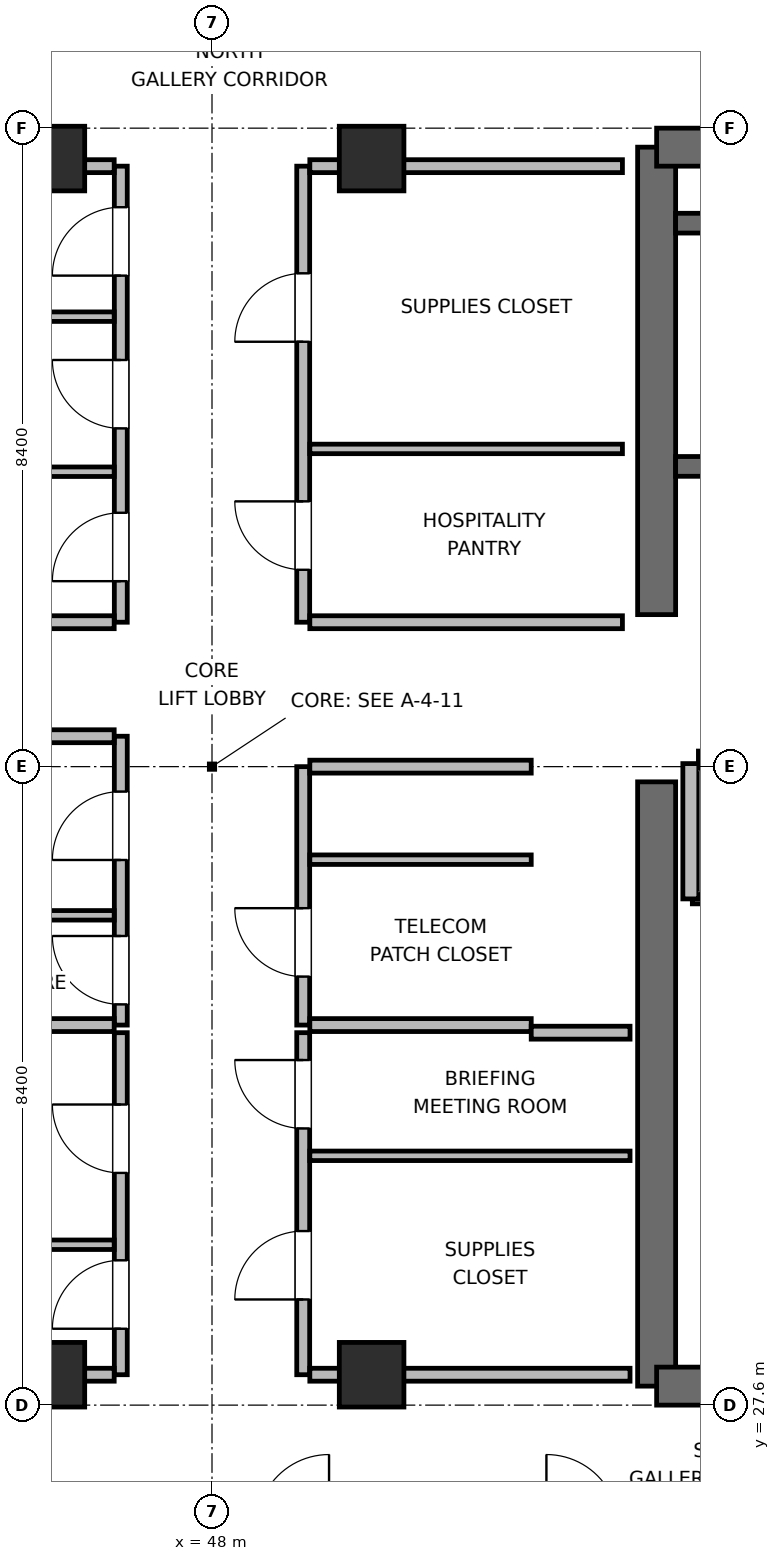
"""IFC4 building model, lengths in metres.
Left out: names, types, materials, properties, quantities, classifications, styles, units other than length and angle.
Written with IfcOpenShell. Run it as: python <this file> out.ifc"""

import sys

from ifc_helpers import new_model, si_unit, direction, frame, frame_2d, origin, origin_2d, place, context, subcontext, project, spatial, rectangle, extrude, element, fill, save


model = new_model("IFC4")
c1 = context("Model", 3, precision=1e-05, world=origin(), true_north=direction((0.0, 1.0)))
c2 = subcontext(c1, "Body", "Model", "MODEL_VIEW")
j1 = project(units=[si_unit("LENGTHUNIT", "METRE"), si_unit("PLANEANGLEUNIT", "RADIAN")], contexts=[c1])
p1 = place(None, origin())
s1 = spatial("IfcSite", under=j1, at=p1, CompositionType="ELEMENT")
p2 = place(p1, origin())
s2 = spatial("IfcBuilding", under=s1, at=p2, CompositionType="ELEMENT")
p3 = place(p2, frame((0.0, 0.0, 350.4)))
s3 = spatial("IfcBuildingStorey", under=s2, at=p3, CompositionType="ELEMENT", Elevation=350.4)
p4 = place(p3, frame((53.85, 27.85, 0.0), z_axis=(0.0, 0.0, 1.0), x_axis=(0.0, 1.0, 0.0)))
e1 = element("IfcWall", 1, at=p4, inside=s3, PredefinedType="SHEAR", context=c2, shape_type="SweptSolid", body=[
    extrude(rectangle(XDim=7.95, YDim=0.5, at=frame_2d((3.975, 0.0))), origin(), (0.0, 0.0, 1.0), 4.5),
])
p5 = place(p3, frame((53.85, 38.0, 0.0), z_axis=(0.0, 0.0, 1.0), x_axis=(0.0, 1.0, 0.0)))
e2 = element("IfcWall", 2, at=p5, inside=s3, PredefinedType="SHEAR", context=c2, shape_type="SweptSolid", body=[
    extrude(rectangle(XDim=6.15, YDim=0.5, at=frame_2d((3.075, 0.0))), origin(), (0.0, 0.0, 1.0), 4.5),
])
p6 = place(p3, frame((53.85, 27.85, 0.0), z_axis=(0.0, 0.0, 1.0), x_axis=(1.0, 0.0, 0.0)))
e3 = element("IfcWall", 3, at=p6, inside=s3, PredefinedType="SHEAR", context=c2, shape_type="SweptSolid", body=[
    extrude(rectangle(XDim=9.5, YDim=0.5, at=frame_2d((4.75, 0.0))), origin(), (0.0, 0.0, 1.0), 4.5),
])
p7 = place(p6, frame((4.025, 0.0, 0.0)))
e4 = element("IfcOpeningElement", 4, at=p7, cuts=e3, PredefinedType="OPENING", context=c2, shape_type="SweptSolid", body=[
    extrude(rectangle(XDim=1.05, YDim=2.04, at=frame_2d((0.525, 1.02))), frame((0.0, 0.26, 0.0), z_axis=(0.0, -1.0, 0.0), x_axis=(1.0, 0.0, 0.0)), (0.0, 0.0, 1.0), 0.52),
])
p8 = place(p3, frame((53.85, 44.15, 0.0), z_axis=(0.0, 0.0, 1.0), x_axis=(1.0, 0.0, 0.0)))
e5 = element("IfcWall", 5, at=p8, inside=s3, PredefinedType="SHEAR", context=c2, shape_type="SweptSolid", body=[
    extrude(rectangle(XDim=9.5, YDim=0.5, at=frame_2d((4.75, 0.0))), origin(), (0.0, 0.0, 1.0), 4.5),
])
p9 = place(p3, frame((54.1, 39.95, 0.0), z_axis=(0.0, 0.0, 1.0), x_axis=(1.0, 0.0, 0.0)))
e6 = element("IfcWall", 6, at=p9, inside=s3, PredefinedType="SHEAR", context=c2, shape_type="SweptSolid", body=[
    extrude(rectangle(XDim=9.0, YDim=0.26, at=frame_2d((4.5, 0.0))), origin(), (0.0, 0.0, 1.0), 4.5),
])
p10 = place(p9, frame((1.1, 0.0, 0.0)))
e7 = element("IfcOpeningElement", 7, at=p10, cuts=e6, PredefinedType="OPENING", context=c2, shape_type="SweptSolid", body=[
    extrude(rectangle(XDim=1.0, YDim=2.04, at=frame_2d((0.5, 1.02))), frame((0.0, 0.14, 0.0), z_axis=(0.0, -1.0, 0.0), x_axis=(1.0, 0.0, 0.0)), (0.0, 0.0, 1.0), 0.28),
])
p11 = place(p3, frame((54.1, 43.15, 0.0), z_axis=(0.0, 0.0, 1.0), x_axis=(1.0, 0.0, 0.0)))
e8 = element("IfcWall", 8, at=p11, inside=s3, PredefinedType="SHEAR", context=c2, shape_type="SweptSolid", body=[
    extrude(rectangle(XDim=9.0, YDim=0.26, at=frame_2d((4.5, 0.0))), origin(), (0.0, 0.0, 1.0), 4.5),
])
for number, where, z_axis, x_axis in (
    (9, (45.9, 28.0, 0.0), (0.0, 0.0, 1.0), (1.0, 0.0, 0.0)),
    (10, (50.1, 28.0, 0.0), (0.0, 0.0, 1.0), (1.0, 0.0, 0.0)),
    (11, (45.9, 44.0, 0.0), (0.0, 0.0, 1.0), (1.0, 0.0, 0.0)),
    (12, (50.1, 44.0, 0.0), (0.0, 0.0, 1.0), (1.0, 0.0, 0.0)),
):
    element("IfcColumn", number, at=place(p3, frame(where, z_axis=z_axis, x_axis=x_axis)), inside=s3, PredefinedType="COLUMN", context=c2, shape_type="SweptSolid", body=[
        extrude(rectangle(XDim=0.85, YDim=0.85, at=origin_2d()), origin(), (0.0, 0.0, 1.0), 4.5),
    ])
p12 = place(p3, frame((54.32, 34.3, 0.0), z_axis=(0.0, 0.0, 1.0), x_axis=(1.0, 0.0, 0.0)))
e13 = element("IfcWall", 13, at=p12, inside=s3, PredefinedType="PARTITIONING", context=c2, shape_type="SweptSolid", body=[
    extrude(rectangle(XDim=3.48, YDim=0.21, at=frame_2d((1.74, 0.0))), origin(), (0.0, 0.0, 1.0), 4.2),
])
p13 = place(p3, frame((54.4, 36.1, 0.0), z_axis=(0.0, 0.0, 1.0), x_axis=(1.0, 0.0, 0.0)))
e14 = element("IfcWall", 14, at=p13, inside=s3, PredefinedType="PARTITIONING", context=c2, shape_type="SweptSolid", body=[
    extrude(rectangle(XDim=2.1, YDim=0.21, at=frame_2d((1.05, 0.0))), origin(), (0.0, 0.0, 1.0), 4.2),
])
p14 = place(p13, frame((0.5, 0.0, 0.0)))
e15 = element("IfcOpeningElement", 15, at=p14, cuts=e14, PredefinedType="OPENING", context=c2, shape_type="SweptSolid", body=[
    extrude(rectangle(XDim=1.1, YDim=2.04, at=frame_2d((0.55, 1.02))), frame((0.0, 0.115, 0.0), z_axis=(0.0, -1.0, 0.0), x_axis=(1.0, 0.0, 0.0)), (0.0, 0.0, 1.0), 0.23),
])
p15 = place(p3, frame((54.3, 34.26, 0.0), z_axis=(0.0, 0.0, 1.0), x_axis=(0.0, 1.0, 0.0)))
e16 = element("IfcWall", 16, at=p15, inside=s3, PredefinedType="PARTITIONING", context=c2, shape_type="SweptSolid", body=[
    extrude(rectangle(XDim=1.78, YDim=0.21, at=frame_2d((0.89, 0.0))), origin(), (0.0, 0.0, 1.0), 4.2),
])
p16 = place(p3, frame((46.8, 32.6, 0.0), z_axis=(0.0, 0.0, 1.0), x_axis=(0.0, 1.0, 0.0)))
e17 = element("IfcWall", 17, at=p16, inside=s3, PredefinedType="PARTITIONING", context=c2, shape_type="SweptSolid", body=[
    extrude(rectangle(XDim=3.8, YDim=0.17, at=frame_2d((1.9, 0.0))), origin(), (0.0, 0.0, 1.0), 4.2),
])
p17 = place(p16, frame((0.272, 0.0, 0.0)))
e18 = element("IfcOpeningElement", 18, at=p17, cuts=e17, PredefinedType="OPENING", context=c2, shape_type="SweptSolid", body=[
    extrude(rectangle(XDim=0.9, YDim=2.02, at=frame_2d((0.45, 1.01))), frame((0.0, 0.095, 0.0), z_axis=(0.0, -1.0, 0.0), x_axis=(1.0, 0.0, 0.0)), (0.0, 0.0, 1.0), 0.19),
])
p18 = place(p16, frame((2.172, 0.0, 0.0)))
e19 = element("IfcOpeningElement", 19, at=p18, cuts=e17, PredefinedType="OPENING", context=c2, shape_type="SweptSolid", body=[
    extrude(rectangle(XDim=0.9, YDim=2.02, at=frame_2d((0.45, 1.01))), frame((0.0, 0.095, 0.0), z_axis=(0.0, -1.0, 0.0), x_axis=(1.0, 0.0, 0.0)), (0.0, 0.0, 1.0), 0.19),
])
for number, where, z_axis, x_axis in (
    (20, (43.8, 32.6, 0.0), (0.0, 0.0, 1.0), (1.0, 0.0, 0.0)),
    (21, (43.8, 36.4, 0.0), (0.0, 0.0, 1.0), (1.0, 0.0, 0.0)),
):
    element("IfcWall", number, at=place(p3, frame(where, z_axis=z_axis, x_axis=x_axis)), inside=s3, PredefinedType="PARTITIONING", context=c2, shape_type="SweptSolid", body=[
        extrude(rectangle(XDim=2.913, YDim=0.17, at=frame_2d((1.457, 0.0))), origin(), (0.0, 0.0, 1.0), 4.2),
    ])
p19 = place(p3, frame((43.8, 34.044, 0.0), z_axis=(0.0, 0.0, 1.0), x_axis=(1.0, 0.0, 0.0)))
e22 = element("IfcWall", 22, at=p19, inside=s3, PredefinedType="PARTITIONING", context=c2, shape_type="SweptSolid", body=[
    extrude(rectangle(XDim=2.913, YDim=0.125, at=frame_2d((1.457, 0.0))), origin(), (0.0, 0.0, 1.0), 4.2),
])
p20 = place(p3, frame((49.2, 32.6, 0.0), z_axis=(0.0, 0.0, 1.0), x_axis=(0.0, 1.0, 0.0)))
e23 = element("IfcWall", 23, at=p20, inside=s3, PredefinedType="PARTITIONING", context=c2, shape_type="SweptSolid", body=[
    extrude(rectangle(XDim=3.4, YDim=0.17, at=frame_2d((1.7, 0.0))), origin(), (0.0, 0.0, 1.0), 4.2),
])
p21 = place(p20, frame((0.638, 0.0, 0.0)))
e24 = element("IfcOpeningElement", 24, at=p21, cuts=e23, PredefinedType="OPENING", context=c2, shape_type="SweptSolid", body=[
    extrude(rectangle(XDim=0.9, YDim=2.02, at=frame_2d((0.45, 1.01))), frame((0.0, 0.095, 0.0), z_axis=(0.0, -1.0, 0.0), x_axis=(1.0, 0.0, 0.0)), (0.0, 0.0, 1.0), 0.19),
])
for number, where, z_axis, x_axis in (
    (25, (49.287, 32.6, 0.0), (0.0, 0.0, 1.0), (1.0, 0.0, 0.0)),
    (26, (49.287, 36.0, 0.0), (0.0, 0.0, 1.0), (1.0, 0.0, 0.0)),
):
    element("IfcWall", number, at=place(p3, frame(where, z_axis=z_axis, x_axis=x_axis)), inside=s3, PredefinedType="PARTITIONING", context=c2, shape_type="SweptSolid", body=[
        extrude(rectangle(XDim=2.913, YDim=0.17, at=frame_2d((1.457, 0.0))), origin(), (0.0, 0.0, 1.0), 4.2),
    ])
p22 = place(p3, frame((49.287, 34.776, 0.0), z_axis=(0.0, 0.0, 1.0), x_axis=(1.0, 0.0, 0.0)))
e27 = element("IfcWall", 27, at=p22, inside=s3, PredefinedType="PARTITIONING", context=c2, shape_type="SweptSolid", body=[
    extrude(rectangle(XDim=2.913, YDim=0.125, at=frame_2d((1.457, 0.0))), origin(), (0.0, 0.0, 1.0), 4.2),
])
p23 = place(p3, frame((46.8, 28.0, 0.0), z_axis=(0.0, 0.0, 1.0), x_axis=(0.0, 1.0, 0.0)))
e28 = element("IfcWall", 28, at=p23, inside=s3, PredefinedType="PARTITIONING", context=c2, shape_type="SweptSolid", body=[
    extrude(rectangle(XDim=4.5, YDim=0.17, at=frame_2d((2.25, 0.0))), origin(), (0.0, 0.0, 1.0), 4.2),
])
p24 = place(p23, frame((0.605, 0.0, 0.0)))
e29 = element("IfcOpeningElement", 29, at=p24, cuts=e28, PredefinedType="OPENING", context=c2, shape_type="SweptSolid", body=[
    extrude(rectangle(XDim=0.9, YDim=2.02, at=frame_2d((0.45, 1.01))), frame((0.0, 0.095, 0.0), z_axis=(0.0, -1.0, 0.0), x_axis=(1.0, 0.0, 0.0)), (0.0, 0.0, 1.0), 0.19),
])
p25 = place(p23, frame((2.655, 0.0, 0.0)))
e30 = element("IfcOpeningElement", 30, at=p25, cuts=e28, PredefinedType="OPENING", context=c2, shape_type="SweptSolid", body=[
    extrude(rectangle(XDim=0.9, YDim=2.02, at=frame_2d((0.45, 1.01))), frame((0.0, 0.095, 0.0), z_axis=(0.0, -1.0, 0.0), x_axis=(1.0, 0.0, 0.0)), (0.0, 0.0, 1.0), 0.19),
])
p26 = place(p3, frame((42.5, 28.0, 0.0), z_axis=(0.0, 0.0, 1.0), x_axis=(1.0, 0.0, 0.0)))
e31 = element("IfcWall", 31, at=p26, inside=s3, PredefinedType="PARTITIONING", context=c2, shape_type="SweptSolid", body=[
    extrude(rectangle(XDim=4.213, YDim=0.17, at=frame_2d((2.106, 0.0))), origin(), (0.0, 0.0, 1.0), 3.285),
])
p27 = place(p3, frame((42.5, 29.71, 0.0), z_axis=(0.0, 0.0, 1.0), x_axis=(1.0, 0.0, 0.0)))
e32 = element("IfcWall", 32, at=p27, inside=s3, PredefinedType="PARTITIONING", context=c2, shape_type="SweptSolid", body=[
    extrude(rectangle(XDim=4.213, YDim=0.125, at=frame_2d((2.106, 0.0))), origin(), (0.0, 0.0, 1.0), 4.2),
])
p28 = place(p3, frame((49.2, 28.0, 0.0), z_axis=(0.0, 0.0, 1.0), x_axis=(0.0, 1.0, 0.0)))
e33 = element("IfcWall", 33, at=p28, inside=s3, PredefinedType="PARTITIONING", context=c2, shape_type="SweptSolid", body=[
    extrude(rectangle(XDim=4.5, YDim=0.17, at=frame_2d((2.25, 0.0))), origin(), (0.0, 0.0, 1.0), 4.2),
])
p29 = place(p28, frame((0.99, 0.0, 0.0)))
e34 = element("IfcOpeningElement", 34, at=p29, cuts=e33, PredefinedType="OPENING", context=c2, shape_type="SweptSolid", body=[
    extrude(rectangle(XDim=0.9, YDim=2.02, at=frame_2d((0.45, 1.01))), frame((0.0, 0.095, 0.0), z_axis=(0.0, -1.0, 0.0), x_axis=(1.0, 0.0, 0.0)), (0.0, 0.0, 1.0), 0.19),
])
p30 = place(p28, frame((3.24, 0.0, 0.0)))
e35 = element("IfcOpeningElement", 35, at=p30, cuts=e33, PredefinedType="OPENING", context=c2, shape_type="SweptSolid", body=[
    extrude(rectangle(XDim=0.9, YDim=2.02, at=frame_2d((0.45, 1.01))), frame((0.0, 0.095, 0.0), z_axis=(0.0, -1.0, 0.0), x_axis=(1.0, 0.0, 0.0)), (0.0, 0.0, 1.0), 0.19),
])
p31 = place(p3, frame((49.287, 28.0, 0.0), z_axis=(0.0, 0.0, 1.0), x_axis=(1.0, 0.0, 0.0)))
e36 = element("IfcWall", 36, at=p31, inside=s3, PredefinedType="PARTITIONING", context=c2, shape_type="SweptSolid", body=[
    extrude(rectangle(XDim=4.213, YDim=0.17, at=frame_2d((2.106, 0.0))), origin(), (0.0, 0.0, 1.0), 3.285),
])
p32 = place(p3, frame((52.2, 32.5, 0.0), z_axis=(0.0, 0.0, 1.0), x_axis=(1.0, 0.0, 0.0)))
e37 = element("IfcWall", 37, at=p32, inside=s3, PredefinedType="PARTITIONING", context=c2, shape_type="SweptSolid", body=[
    extrude(rectangle(XDim=1.3, YDim=0.17, at=frame_2d((0.65, 0.0))), origin(), (0.0, 0.0, 1.0), 4.2),
])
p33 = place(p3, frame((49.287, 30.88, 0.0), z_axis=(0.0, 0.0, 1.0), x_axis=(1.0, 0.0, 0.0)))
e38 = element("IfcWall", 38, at=p33, inside=s3, PredefinedType="PARTITIONING", context=c2, shape_type="SweptSolid", body=[
    extrude(rectangle(XDim=4.213, YDim=0.125, at=frame_2d((2.106, 0.0))), origin(), (0.0, 0.0, 1.0), 4.2),
])
p34 = place(p3, frame((46.8, 37.9, 0.0), z_axis=(0.0, 0.0, 1.0), x_axis=(0.0, 1.0, 0.0)))
e39 = element("IfcWall", 39, at=p34, inside=s3, PredefinedType="PARTITIONING", context=c2, shape_type="SweptSolid", body=[
    extrude(rectangle(XDim=6.0, YDim=0.17, at=frame_2d((3.0, 0.0))), origin(), (0.0, 0.0, 1.0), 4.2),
])
p35 = place(p34, frame((0.54, 0.0, 0.0)))
e40 = element("IfcOpeningElement", 40, at=p35, cuts=e39, PredefinedType="OPENING", context=c2, shape_type="SweptSolid", body=[
    extrude(rectangle(XDim=0.9, YDim=2.02, at=frame_2d((0.45, 1.01))), frame((0.0, 0.095, 0.0), z_axis=(0.0, -1.0, 0.0), x_axis=(1.0, 0.0, 0.0)), (0.0, 0.0, 1.0), 0.19),
])
p36 = place(p34, frame((2.55, 0.0, 0.0)))
e41 = element("IfcOpeningElement", 41, at=p36, cuts=e39, PredefinedType="OPENING", context=c2, shape_type="SweptSolid", body=[
    extrude(rectangle(XDim=0.9, YDim=2.02, at=frame_2d((0.45, 1.01))), frame((0.0, 0.095, 0.0), z_axis=(0.0, -1.0, 0.0), x_axis=(1.0, 0.0, 0.0)), (0.0, 0.0, 1.0), 0.19),
])
p37 = place(p34, frame((4.56, 0.0, 0.0)))
e42 = element("IfcOpeningElement", 42, at=p37, cuts=e39, PredefinedType="OPENING", context=c2, shape_type="SweptSolid", body=[
    extrude(rectangle(XDim=0.9, YDim=2.02, at=frame_2d((0.45, 1.01))), frame((0.0, 0.095, 0.0), z_axis=(0.0, -1.0, 0.0), x_axis=(1.0, 0.0, 0.0)), (0.0, 0.0, 1.0), 0.19),
])
p38 = place(p3, frame((42.5, 37.9, 0.0), z_axis=(0.0, 0.0, 1.0), x_axis=(1.0, 0.0, 0.0)))
e43 = element("IfcWall", 43, at=p38, inside=s3, PredefinedType="PARTITIONING", context=c2, shape_type="SweptSolid", body=[
    extrude(rectangle(XDim=4.213, YDim=0.17, at=frame_2d((2.106, 0.0))), origin(), (0.0, 0.0, 1.0), 4.2),
])
p39 = place(p3, frame((42.5, 43.9, 0.0), z_axis=(0.0, 0.0, 1.0), x_axis=(1.0, 0.0, 0.0)))
e44 = element("IfcWall", 44, at=p39, inside=s3, PredefinedType="PARTITIONING", context=c2, shape_type="SweptSolid", body=[
    extrude(rectangle(XDim=4.213, YDim=0.17, at=frame_2d((2.106, 0.0))), origin(), (0.0, 0.0, 1.0), 3.285),
])
for number, where, z_axis, x_axis in (
    (45, (42.5, 39.88, 0.0), (0.0, 0.0, 1.0), (1.0, 0.0, 0.0)),
    (46, (42.5, 41.92, 0.0), (0.0, 0.0, 1.0), (1.0, 0.0, 0.0)),
):
    element("IfcWall", number, at=place(p3, frame(where, z_axis=z_axis, x_axis=x_axis)), inside=s3, PredefinedType="PARTITIONING", context=c2, shape_type="SweptSolid", body=[
        extrude(rectangle(XDim=4.213, YDim=0.125, at=frame_2d((2.106, 0.0))), origin(), (0.0, 0.0, 1.0), 4.2),
    ])
p40 = place(p3, frame((49.2, 37.9, 0.0), z_axis=(0.0, 0.0, 1.0), x_axis=(0.0, 1.0, 0.0)))
e47 = element("IfcWall", 47, at=p40, inside=s3, PredefinedType="PARTITIONING", context=c2, shape_type="SweptSolid", body=[
    extrude(rectangle(XDim=6.0, YDim=0.17, at=frame_2d((3.0, 0.0))), origin(), (0.0, 0.0, 1.0), 4.2),
])
p41 = place(p40, frame((0.69, 0.0, 0.0)))
e48 = element("IfcOpeningElement", 48, at=p41, cuts=e47, PredefinedType="OPENING", context=c2, shape_type="SweptSolid", body=[
    extrude(rectangle(XDim=0.9, YDim=2.02, at=frame_2d((0.45, 1.01))), frame((0.0, 0.095, 0.0), z_axis=(0.0, -1.0, 0.0), x_axis=(1.0, 0.0, 0.0)), (0.0, 0.0, 1.0), 0.19),
])
p42 = place(p40, frame((3.69, 0.0, 0.0)))
e49 = element("IfcOpeningElement", 49, at=p42, cuts=e47, PredefinedType="OPENING", context=c2, shape_type="SweptSolid", body=[
    extrude(rectangle(XDim=0.9, YDim=2.02, at=frame_2d((0.45, 1.01))), frame((0.0, 0.095, 0.0), z_axis=(0.0, -1.0, 0.0), x_axis=(1.0, 0.0, 0.0)), (0.0, 0.0, 1.0), 0.19),
])
p43 = place(p3, frame((49.287, 37.9, 0.0), z_axis=(0.0, 0.0, 1.0), x_axis=(1.0, 0.0, 0.0)))
e50 = element("IfcWall", 50, at=p43, inside=s3, PredefinedType="PARTITIONING", context=c2, shape_type="SweptSolid", body=[
    extrude(rectangle(XDim=4.113, YDim=0.17, at=frame_2d((2.056, 0.0))), origin(), (0.0, 0.0, 1.0), 4.2),
])
p44 = place(p3, frame((49.287, 43.9, 0.0), z_axis=(0.0, 0.0, 1.0), x_axis=(1.0, 0.0, 0.0)))
e51 = element("IfcWall", 51, at=p44, inside=s3, PredefinedType="PARTITIONING", context=c2, shape_type="SweptSolid", body=[
    extrude(rectangle(XDim=4.113, YDim=0.17, at=frame_2d((2.056, 0.0))), origin(), (0.0, 0.0, 1.0), 3.285),
])
p45 = place(p3, frame((49.287, 40.18, 0.0), z_axis=(0.0, 0.0, 1.0), x_axis=(1.0, 0.0, 0.0)))
e52 = element("IfcWall", 52, at=p45, inside=s3, PredefinedType="PARTITIONING", context=c2, shape_type="SweptSolid", body=[
    extrude(rectangle(XDim=4.113, YDim=0.125, at=frame_2d((2.056, 0.0))), origin(), (0.0, 0.0, 1.0), 4.2),
])
p46 = place(p17, origin())
e53 = element("IfcDoor", 53, at=p46, inside=s3, OperationType="SINGLE_SWING_RIGHT", PredefinedType="DOOR", context=c2, shape_type="SweptSolid", body=[
    extrude(rectangle(XDim=0.9, YDim=2.02, at=frame_2d((0.45, 1.01))), frame((0.0, 0.025, 0.0), z_axis=(0.0, -1.0, 0.0), x_axis=(1.0, 0.0, 0.0)), (0.0, 0.0, 1.0), 0.05),
])
fill(e18, e53)
p47 = place(p18, origin())
e54 = element("IfcDoor", 54, at=p47, inside=s3, OperationType="SINGLE_SWING_LEFT", PredefinedType="DOOR", context=c2, shape_type="SweptSolid", body=[
    extrude(rectangle(XDim=0.9, YDim=2.02, at=frame_2d((0.45, 1.01))), frame((0.0, 0.025, 0.0), z_axis=(0.0, -1.0, 0.0), x_axis=(1.0, 0.0, 0.0)), (0.0, 0.0, 1.0), 0.05),
])
fill(e19, e54)
p48 = place(p21, origin())
e55 = element("IfcDoor", 55, at=p48, inside=s3, OperationType="SINGLE_SWING_RIGHT", PredefinedType="DOOR", context=c2, shape_type="SweptSolid", body=[
    extrude(rectangle(XDim=0.9, YDim=2.02, at=frame_2d((0.45, 1.01))), frame((0.0, 0.025, 0.0), z_axis=(0.0, -1.0, 0.0), x_axis=(1.0, 0.0, 0.0)), (0.0, 0.0, 1.0), 0.05),
])
fill(e24, e55)
p49 = place(p24, origin())
e56 = element("IfcDoor", 56, at=p49, inside=s3, OperationType="SINGLE_SWING_LEFT", PredefinedType="DOOR", context=c2, shape_type="SweptSolid", body=[
    extrude(rectangle(XDim=0.9, YDim=2.02, at=frame_2d((0.45, 1.01))), frame((0.0, 0.025, 0.0), z_axis=(0.0, -1.0, 0.0), x_axis=(1.0, 0.0, 0.0)), (0.0, 0.0, 1.0), 0.05),
])
fill(e29, e56)
p50 = place(p25, origin())
e57 = element("IfcDoor", 57, at=p50, inside=s3, OperationType="SINGLE_SWING_RIGHT", PredefinedType="DOOR", context=c2, shape_type="SweptSolid", body=[
    extrude(rectangle(XDim=0.9, YDim=2.02, at=frame_2d((0.45, 1.01))), frame((0.0, 0.025, 0.0), z_axis=(0.0, -1.0, 0.0), x_axis=(1.0, 0.0, 0.0)), (0.0, 0.0, 1.0), 0.05),
])
fill(e30, e57)
p51 = place(p29, origin())
e58 = element("IfcDoor", 58, at=p51, inside=s3, OperationType="SINGLE_SWING_LEFT", PredefinedType="DOOR", context=c2, shape_type="SweptSolid", body=[
    extrude(rectangle(XDim=0.9, YDim=2.02, at=frame_2d((0.45, 1.01))), frame((0.0, 0.025, 0.0), z_axis=(0.0, -1.0, 0.0), x_axis=(1.0, 0.0, 0.0)), (0.0, 0.0, 1.0), 0.05),
])
fill(e34, e58)
p52 = place(p30, origin())
e59 = element("IfcDoor", 59, at=p52, inside=s3, OperationType="SINGLE_SWING_RIGHT", PredefinedType="DOOR", context=c2, shape_type="SweptSolid", body=[
    extrude(rectangle(XDim=0.9, YDim=2.02, at=frame_2d((0.45, 1.01))), frame((0.0, 0.025, 0.0), z_axis=(0.0, -1.0, 0.0), x_axis=(1.0, 0.0, 0.0)), (0.0, 0.0, 1.0), 0.05),
])
fill(e35, e59)
p53 = place(p35, origin())
e60 = element("IfcDoor", 60, at=p53, inside=s3, OperationType="SINGLE_SWING_LEFT", PredefinedType="DOOR", context=c2, shape_type="SweptSolid", body=[
    extrude(rectangle(XDim=0.9, YDim=2.02, at=frame_2d((0.45, 1.01))), frame((0.0, 0.025, 0.0), z_axis=(0.0, -1.0, 0.0), x_axis=(1.0, 0.0, 0.0)), (0.0, 0.0, 1.0), 0.05),
])
fill(e40, e60)
p54 = place(p36, origin())
e61 = element("IfcDoor", 61, at=p54, inside=s3, OperationType="SINGLE_SWING_RIGHT", PredefinedType="DOOR", context=c2, shape_type="SweptSolid", body=[
    extrude(rectangle(XDim=0.9, YDim=2.02, at=frame_2d((0.45, 1.01))), frame((0.0, 0.025, 0.0), z_axis=(0.0, -1.0, 0.0), x_axis=(1.0, 0.0, 0.0)), (0.0, 0.0, 1.0), 0.05),
])
fill(e41, e61)
p55 = place(p37, origin())
e62 = element("IfcDoor", 62, at=p55, inside=s3, OperationType="SINGLE_SWING_LEFT", PredefinedType="DOOR", context=c2, shape_type="SweptSolid", body=[
    extrude(rectangle(XDim=0.9, YDim=2.02, at=frame_2d((0.45, 1.01))), frame((0.0, 0.025, 0.0), z_axis=(0.0, -1.0, 0.0), x_axis=(1.0, 0.0, 0.0)), (0.0, 0.0, 1.0), 0.05),
])
fill(e42, e62)
p56 = place(p41, origin())
e63 = element("IfcDoor", 63, at=p56, inside=s3, OperationType="SINGLE_SWING_RIGHT", PredefinedType="DOOR", context=c2, shape_type="SweptSolid", body=[
    extrude(rectangle(XDim=0.9, YDim=2.02, at=frame_2d((0.45, 1.01))), frame((0.0, 0.025, 0.0), z_axis=(0.0, -1.0, 0.0), x_axis=(1.0, 0.0, 0.0)), (0.0, 0.0, 1.0), 0.05),
])
fill(e48, e63)
p57 = place(p42, origin())
e64 = element("IfcDoor", 64, at=p57, inside=s3, OperationType="SINGLE_SWING_LEFT", PredefinedType="DOOR", context=c2, shape_type="SweptSolid", body=[
    extrude(rectangle(XDim=0.9, YDim=2.02, at=frame_2d((0.45, 1.01))), frame((0.0, 0.025, 0.0), z_axis=(0.0, -1.0, 0.0), x_axis=(1.0, 0.0, 0.0)), (0.0, 0.0, 1.0), 0.05),
])
fill(e49, e64)
save(model, sys.argv[1])
